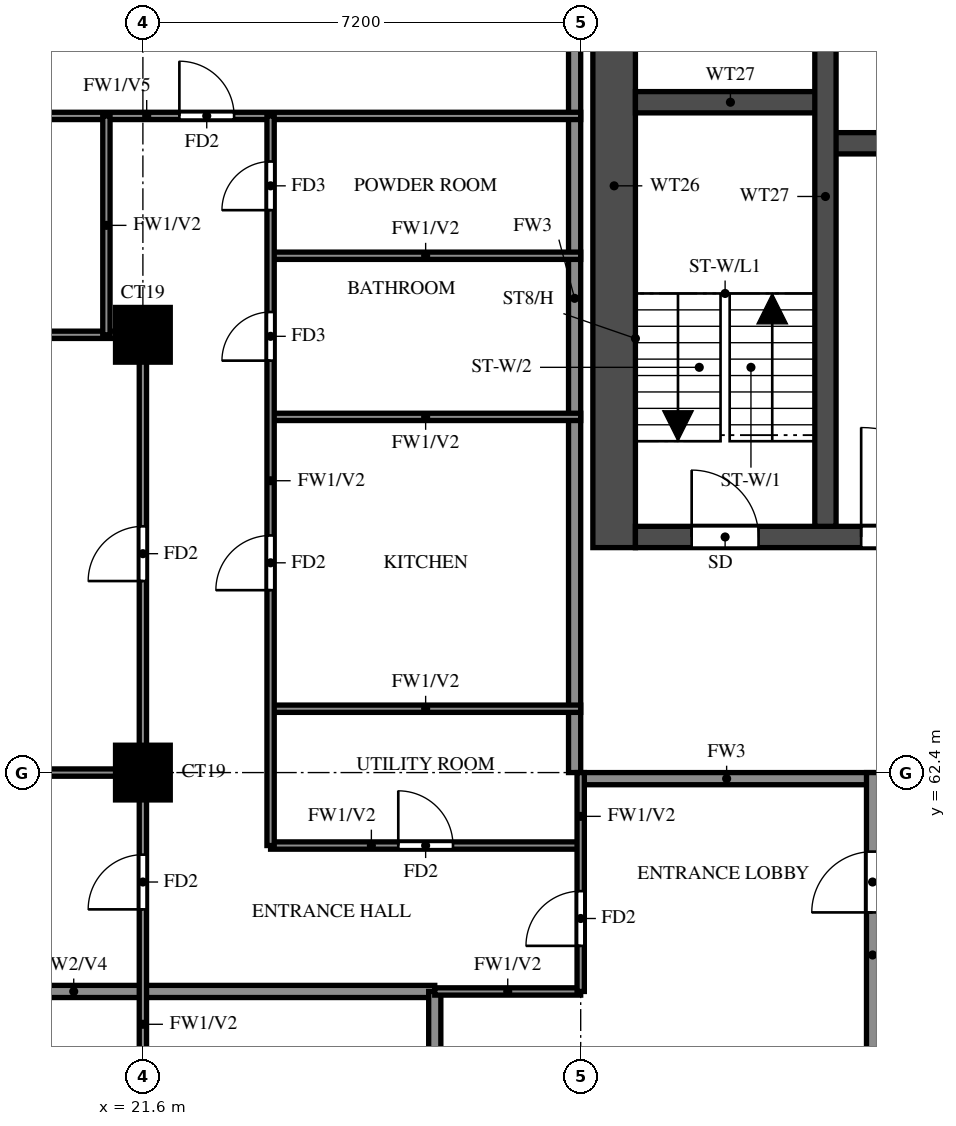
"""IFC4 building model, lengths in metres.
Left out: names, types, materials, properties, quantities, classifications, styles, units other than length and angle.
Written with IfcOpenShell. Run it as: python <this file> out.ifc"""

import sys

from ifc_helpers import new_model, si_unit, direction, frame, frame_2d, origin, origin_2d, place, context, subcontext, project, spatial, rectangle, extrude, source, transform, mapped, element, fill, save


model = new_model("IFC4")
c1 = context("Model", 3, precision=1e-05, world=origin(), true_north=direction((0.0, 1.0)))
c2 = subcontext(c1, "Body", "Model", "MODEL_VIEW")
j1 = project(units=[si_unit("LENGTHUNIT", "METRE"), si_unit("PLANEANGLEUNIT", "RADIAN")], contexts=[c1])
p1 = place(None, origin())
s1 = spatial("IfcSite", under=j1, at=p1, CompositionType="ELEMENT")
p2 = place(p1, origin())
s2 = spatial("IfcBuilding", under=s1, at=p2, CompositionType="ELEMENT")
p3 = place(p2, frame((0.0, 0.0, 174.5)))
s3 = spatial("IfcBuildingStorey", under=s2, at=p3, CompositionType="ELEMENT", Elevation=174.5)
m1 = source(origin(), c2, "Body", "SweptSolid", [
    extrude(rectangle(XDim=0.9, YDim=0.9, at=origin_2d()), origin(), (0.0, 0.0, 1.0), 3.2),
])
for number, where, z_axis, x_axis in (
    (1, (21.6, 62.4, 0.0), (0.0, 0.0, 1.0), (1.0, 0.0, 0.0)),
    (2, (21.6, 69.6, 0.0), (0.0, 0.0, 1.0), (1.0, 0.0, 0.0)),
):
    element("IfcColumn", number, at=place(p3, frame(where, z_axis=z_axis, x_axis=x_axis)), inside=s3, PredefinedType="COLUMN", context=c2, shape_type="MappedRepresentation", body=[
        mapped(m1, transform((0.0, 0.0, 0.0))),
    ])
p4 = place(p3, frame((29.35, 66.1, 0.0), z_axis=(0.0, 0.0, 1.0), x_axis=(0.0, 1.0, 0.0)))
e3 = element("IfcWall", 3, at=p4, inside=s3, PredefinedType="SHEAR", context=c2, shape_type="SweptSolid", body=[
    extrude(rectangle(XDim=11.9, YDim=0.7, at=frame_2d((5.95, 0.0))), origin(), (0.0, 0.0, 1.0), 3.2),
])
p5 = place(p3, frame((29.7, 66.275, 0.0), z_axis=(0.0, 0.0, 1.0), x_axis=(1.0, 0.0, 0.0)))
e4 = element("IfcWall", 4, at=p5, inside=s3, PredefinedType="SHEAR", context=c2, shape_type="SweptSolid", body=[
    extrude(rectangle(XDim=41.4, YDim=0.35, at=frame_2d((20.7, 0.0))), origin(), (0.0, 0.0, 1.0), 3.2),
])
p6 = place(p5, frame((0.925, 0.0, 0.0)))
e5 = element("IfcOpeningElement", 5, at=p6, cuts=e4, PredefinedType="OPENING", context=c2, shape_type="SweptSolid", body=[
    extrude(rectangle(XDim=1.1, YDim=2.1, at=frame_2d((0.55, 1.05))), frame((0.0, 0.185, 0.0), z_axis=(0.0, -1.0, 0.0), x_axis=(1.0, 0.0, 0.0)), (0.0, 0.0, 1.0), 0.37),
])
p7 = place(p5, frame((3.712, 0.0, 0.0)))
e6 = element("IfcOpeningElement", 6, at=p7, cuts=e4, PredefinedType="OPENING", context=c2, shape_type="SweptSolid", body=[
    extrude(rectangle(XDim=1.8, YDim=2.1, at=frame_2d((0.9, 1.05))), frame((0.0, 0.185, 0.0), z_axis=(0.0, -1.0, 0.0), x_axis=(1.0, 0.0, 0.0)), (0.0, 0.0, 1.0), 0.37),
])
p8 = place(p3, frame((32.825, 72.75, 0.0), z_axis=(0.0, 0.0, 1.0), x_axis=(1.0, 0.0, 0.0)))
e7 = element("IfcWall", 7, at=p8, inside=s3, PredefinedType="SHEAR", context=c2, shape_type="SweptSolid", body=[
    extrude(rectangle(XDim=35.15, YDim=0.35, at=frame_2d((17.575, 0.0))), origin(), (0.0, 0.0, 1.0), 3.2),
])
p9 = place(p8, frame((19.8, 0.0, 0.0)))
e8 = element("IfcOpeningElement", 8, at=p9, cuts=e7, PredefinedType="OPENING", context=c2, shape_type="SweptSolid", body=[
    extrude(rectangle(XDim=1.1, YDim=2.1, at=frame_2d((0.55, 1.05))), frame((0.0, 0.185, 0.0), z_axis=(0.0, -1.0, 0.0), x_axis=(1.0, 0.0, 0.0)), (0.0, 0.0, 1.0), 0.37),
])
p10 = place(p8, frame((27.7, 0.0, 0.0)))
e9 = element("IfcOpeningElement", 9, at=p10, cuts=e7, PredefinedType="OPENING", context=c2, shape_type="SweptSolid", body=[
    extrude(rectangle(XDim=1.1, YDim=2.1, at=frame_2d((0.55, 1.05))), frame((0.0, 0.185, 0.0), z_axis=(0.0, -1.0, 0.0), x_axis=(1.0, 0.0, 0.0)), (0.0, 0.0, 1.0), 0.37),
])
p11 = place(p8, frame((30.3, 0.0, 0.0)))
e10 = element("IfcOpeningElement", 10, at=p11, cuts=e7, PredefinedType="OPENING", context=c2, shape_type="SweptSolid", body=[
    extrude(rectangle(XDim=1.1, YDim=2.1, at=frame_2d((0.55, 1.05))), frame((0.0, 0.185, 0.0), z_axis=(0.0, -1.0, 0.0), x_axis=(1.0, 0.0, 0.0)), (0.0, 0.0, 1.0), 0.37),
])
p12 = place(p8, frame((3.8, 0.0, 0.0)))
e11 = element("IfcOpeningElement", 11, at=p12, cuts=e7, PredefinedType="OPENING", context=c2, shape_type="SweptSolid", body=[
    extrude(rectangle(XDim=1.1, YDim=2.1, at=frame_2d((0.55, 1.05))), frame((0.0, 0.185, 0.0), z_axis=(0.0, -1.0, 0.0), x_axis=(1.0, 0.0, 0.0)), (0.0, 0.0, 1.0), 0.37),
])
p13 = place(p8, frame((6.55, 0.0, 0.0)))
e12 = element("IfcOpeningElement", 12, at=p13, cuts=e7, PredefinedType="OPENING", context=c2, shape_type="SweptSolid", body=[
    extrude(rectangle(XDim=1.1, YDim=2.1, at=frame_2d((0.55, 1.05))), frame((0.0, 0.185, 0.0), z_axis=(0.0, -1.0, 0.0), x_axis=(1.0, 0.0, 0.0)), (0.0, 0.0, 1.0), 0.37),
])
p14 = place(p8, frame((9.3, 0.0, 0.0)))
e13 = element("IfcOpeningElement", 13, at=p14, cuts=e7, PredefinedType="OPENING", context=c2, shape_type="SweptSolid", body=[
    extrude(rectangle(XDim=1.1, YDim=2.1, at=frame_2d((0.55, 1.05))), frame((0.0, 0.185, 0.0), z_axis=(0.0, -1.0, 0.0), x_axis=(1.0, 0.0, 0.0)), (0.0, 0.0, 1.0), 0.37),
])
p15 = place(p8, frame((12.05, 0.0, 0.0)))
e14 = element("IfcOpeningElement", 14, at=p15, cuts=e7, PredefinedType="OPENING", context=c2, shape_type="SweptSolid", body=[
    extrude(rectangle(XDim=1.1, YDim=2.1, at=frame_2d((0.55, 1.05))), frame((0.0, 0.185, 0.0), z_axis=(0.0, -1.0, 0.0), x_axis=(1.0, 0.0, 0.0)), (0.0, 0.0, 1.0), 0.37),
])
p16 = place(p8, frame((14.8, 0.0, 0.0)))
e15 = element("IfcOpeningElement", 15, at=p16, cuts=e7, PredefinedType="OPENING", context=c2, shape_type="SweptSolid", body=[
    extrude(rectangle(XDim=1.1, YDim=2.1, at=frame_2d((0.55, 1.05))), frame((0.0, 0.185, 0.0), z_axis=(0.0, -1.0, 0.0), x_axis=(1.0, 0.0, 0.0)), (0.0, 0.0, 1.0), 0.37),
])
p17 = place(p8, frame((17.55, 0.0, 0.0)))
e16 = element("IfcOpeningElement", 16, at=p17, cuts=e7, PredefinedType="OPENING", context=c2, shape_type="SweptSolid", body=[
    extrude(rectangle(XDim=1.1, YDim=2.1, at=frame_2d((0.55, 1.05))), frame((0.0, 0.185, 0.0), z_axis=(0.0, -1.0, 0.0), x_axis=(1.0, 0.0, 0.0)), (0.0, 0.0, 1.0), 0.37),
])
p18 = place(p8, frame((0.938, 0.0, 0.0)))
e17 = element("IfcOpeningElement", 17, at=p18, cuts=e7, PredefinedType="OPENING", context=c2, shape_type="SweptSolid", body=[
    extrude(rectangle(XDim=1.1, YDim=2.1, at=frame_2d((0.55, 1.05))), frame((0.0, 0.185, 0.0), z_axis=(0.0, -1.0, 0.0), x_axis=(1.0, 0.0, 0.0)), (0.0, 0.0, 1.0), 0.37),
])
p19 = place(p3, frame((29.7, 73.425, 0.0), z_axis=(0.0, 0.0, 1.0), x_axis=(1.0, 0.0, 0.0)))
e18 = element("IfcWall", 18, at=p19, inside=s3, PredefinedType="SHEAR", context=c2, shape_type="SweptSolid", body=[
    extrude(rectangle(XDim=3.125, YDim=0.35, at=frame_2d((1.562, 0.0))), origin(), (0.0, 0.0, 1.0), 3.2),
])
p20 = place(p3, frame((32.825, 66.45, 0.0), z_axis=(0.0, 0.0, 1.0), x_axis=(0.0, 1.0, 0.0)))
e19 = element("IfcWall", 19, at=p20, inside=s3, PredefinedType="SHEAR", context=c2, shape_type="SweptSolid", body=[
    extrude(rectangle(XDim=10.85, YDim=0.35, at=frame_2d((5.425, 0.0))), origin(), (0.0, 0.0, 1.0), 3.2),
])
p21 = place(p3, frame((28.8, 62.3, 0.0), z_axis=(0.0, 0.0, 1.0), x_axis=(1.0, 0.0, 0.0)))
e20 = element("IfcWall", 20, at=p21, inside=s3, PredefinedType="SOLIDWALL", context=c2, shape_type="SweptSolid", body=[
    extrude(rectangle(XDim=4.8, YDim=0.2, at=frame_2d((2.4, 0.0))), origin(), (0.0, 0.0, 1.0), 3.2),
])
p22 = place(p3, frame((28.7, 62.4, 0.0), z_axis=(0.0, 0.0, 1.0), x_axis=(0.0, 1.0, 0.0)))
e21 = element("IfcWall", 21, at=p22, inside=s3, PredefinedType="SOLIDWALL", context=c2, shape_type="SweptSolid", body=[
    extrude(rectangle(XDim=15.6, YDim=0.2, at=frame_2d((7.8, 0.0))), origin(), (0.0, 0.0, 1.0), 3.2),
])
p23 = place(p3, frame((33.6, 56.4, 0.0), z_axis=(0.0, 0.0, 1.0), x_axis=(0.0, 1.0, 0.0)))
e22 = element("IfcWall", 22, at=p23, inside=s3, PredefinedType="SOLIDWALL", context=c2, shape_type="SweptSolid", body=[
    extrude(rectangle(XDim=6.0, YDim=0.2, at=frame_2d((3.0, 0.0))), origin(), (0.0, 0.0, 1.0), 3.2),
])
p24 = place(p23, frame((3.7, 0.0, 0.0)))
e23 = element("IfcOpeningElement", 23, at=p24, cuts=e22, PredefinedType="OPENING", context=c2, shape_type="SweptSolid", body=[
    extrude(rectangle(XDim=1.0, YDim=2.1, at=frame_2d((0.5, 1.05))), frame((0.0, 0.11, 0.0), z_axis=(0.0, -1.0, 0.0), x_axis=(1.0, 0.0, 0.0)), (0.0, 0.0, 1.0), 0.22),
])
p25 = place(p3, frame((14.525, 58.8, 0.0), z_axis=(0.0, 0.0, 1.0), x_axis=(1.0, 0.0, 0.0)))
e24 = element("IfcWall", 24, at=p25, inside=s3, PredefinedType="SOLIDWALL", context=c2, shape_type="SweptSolid", body=[
    extrude(rectangle(XDim=11.875, YDim=0.2, at=frame_2d((5.938, 0.0))), origin(), (0.0, 0.0, 1.0), 2.3),
])
p26 = place(p3, frame((26.4, 56.4, 0.0), z_axis=(0.0, 0.0, 1.0), x_axis=(0.0, 1.0, 0.0)))
e25 = element("IfcWall", 25, at=p26, inside=s3, PredefinedType="SOLIDWALL", context=c2, shape_type="SweptSolid", body=[
    extrude(rectangle(XDim=2.4, YDim=0.2, at=frame_2d((1.2, 0.0))), origin(), (0.0, 0.0, 1.0), 3.2),
])
p27 = place(p3, frame((26.4, 58.8, 0.0), z_axis=(0.0, 0.0, 1.0), x_axis=(1.0, 0.0, 0.0)))
e26 = element("IfcWall", 26, at=p27, inside=s3, PredefinedType="PARTITIONING", context=c2, shape_type="SweptSolid", body=[
    extrude(rectangle(XDim=2.4, YDim=0.12, at=frame_2d((1.2, 0.0))), origin(), (0.0, 0.0, 1.0), 3.2),
])
p28 = place(p3, frame((23.7, 61.2, 0.0), z_axis=(0.0, 0.0, 1.0), x_axis=(1.0, 0.0, 0.0)))
e27 = element("IfcWall", 27, at=p28, inside=s3, PredefinedType="PARTITIONING", context=c2, shape_type="SweptSolid", body=[
    extrude(rectangle(XDim=5.1, YDim=0.12, at=frame_2d((2.55, 0.0))), origin(), (0.0, 0.0, 1.0), 3.2),
])
p29 = place(p28, frame((2.1, 0.0, 0.0)))
e28 = element("IfcOpeningElement", 28, at=p29, cuts=e27, PredefinedType="OPENING", context=c2, shape_type="SweptSolid", body=[
    extrude(rectangle(XDim=0.9, YDim=2.1, at=frame_2d((0.45, 1.05))), frame((0.0, 0.07, 0.0), z_axis=(0.0, -1.0, 0.0), x_axis=(1.0, 0.0, 0.0)), (0.0, 0.0, 1.0), 0.14),
])
p30 = place(p3, frame((14.525, 62.4, 0.0), z_axis=(0.0, 0.0, 1.0), x_axis=(1.0, 0.0, 0.0)))
e29 = element("IfcWall", 29, at=p30, inside=s3, PredefinedType="PARTITIONING", context=c2, shape_type="SweptSolid", body=[
    extrude(rectangle(XDim=7.075, YDim=0.12, at=frame_2d((3.538, 0.0))), origin(), (0.0, 0.0, 1.0), 3.2),
])
for number, where, z_axis, x_axis in (
    (30, (23.7, 63.45, 0.0), (0.0, 0.0, 1.0), (1.0, 0.0, 0.0)),
    (31, (23.7, 68.25, 0.0), (0.0, 0.0, 1.0), (1.0, 0.0, 0.0)),
):
    element("IfcWall", number, at=place(p3, frame(where, z_axis=z_axis, x_axis=x_axis)), inside=s3, PredefinedType="PARTITIONING", context=c2, shape_type="SweptSolid", body=[
        extrude(rectangle(XDim=5.1, YDim=0.12, at=frame_2d((2.55, 0.0))), origin(), (0.0, 0.0, 1.0), 3.2),
    ])
p31 = place(p3, frame((14.525, 69.6, 0.0), z_axis=(0.0, 0.0, 1.0), x_axis=(1.0, 0.0, 0.0)))
e32 = element("IfcWall", 32, at=p31, inside=s3, PredefinedType="PARTITIONING", context=c2, shape_type="SweptSolid", body=[
    extrude(rectangle(XDim=7.075, YDim=0.12, at=frame_2d((3.538, 0.0))), origin(), (0.0, 0.0, 1.0), 3.2),
])
p32 = place(p31, frame((2.837, 0.0, 0.0)))
e33 = element("IfcOpeningElement", 33, at=p32, cuts=e32, PredefinedType="OPENING", context=c2, shape_type="SweptSolid", body=[
    extrude(rectangle(XDim=0.8, YDim=2.1, at=frame_2d((0.4, 1.05))), frame((0.0, 0.07, 0.0), z_axis=(0.0, -1.0, 0.0), x_axis=(1.0, 0.0, 0.0)), (0.0, 0.0, 1.0), 0.14),
])
p33 = place(p3, frame((23.7, 70.9, 0.0), z_axis=(0.0, 0.0, 1.0), x_axis=(1.0, 0.0, 0.0)))
e34 = element("IfcWall", 34, at=p33, inside=s3, PredefinedType="PARTITIONING", context=c2, shape_type="SweptSolid", body=[
    extrude(rectangle(XDim=5.1, YDim=0.12, at=frame_2d((2.55, 0.0))), origin(), (0.0, 0.0, 1.0), 3.2),
])
p34 = place(p3, frame((14.525, 73.2, 0.0), z_axis=(0.0, 0.0, 1.0), x_axis=(1.0, 0.0, 0.0)))
e35 = element("IfcWall", 35, at=p34, inside=s3, PredefinedType="PARTITIONING", context=c2, shape_type="SweptSolid", body=[
    extrude(rectangle(XDim=14.275, YDim=0.12, at=frame_2d((7.138, 0.0))), origin(), (0.0, 0.0, 1.0), 2.3),
])
p35 = place(p34, frame((7.675, 0.0, 0.0)))
e36 = element("IfcOpeningElement", 36, at=p35, cuts=e35, PredefinedType="OPENING", context=c2, shape_type="SweptSolid", body=[
    extrude(rectangle(XDim=0.9, YDim=2.1, at=frame_2d((0.45, 1.05))), frame((0.0, 0.07, 0.0), z_axis=(0.0, -1.0, 0.0), x_axis=(1.0, 0.0, 0.0)), (0.0, 0.0, 1.0), 0.14),
])
p36 = place(p3, frame((21.0, 69.6, 0.0), z_axis=(0.0, 0.0, 1.0), x_axis=(0.0, 1.0, 0.0)))
e37 = element("IfcWall", 37, at=p36, inside=s3, PredefinedType="PARTITIONING", context=c2, shape_type="SweptSolid", body=[
    extrude(rectangle(XDim=3.6, YDim=0.12, at=frame_2d((1.8, 0.0))), origin(), (0.0, 0.0, 1.0), 3.2),
])
p37 = place(p3, frame((21.6, 48.0, 0.0), z_axis=(0.0, 0.0, 1.0), x_axis=(0.0, 1.0, 0.0)))
e38 = element("IfcWall", 38, at=p37, inside=s3, PredefinedType="PARTITIONING", context=c2, shape_type="SweptSolid", body=[
    extrude(rectangle(XDim=21.6, YDim=0.12, at=frame_2d((10.8, 0.0))), origin(), (0.0, 0.0, 1.0), 3.2),
])
p38 = place(p37, frame((1.35, 0.0, 0.0)))
e39 = element("IfcOpeningElement", 39, at=p38, cuts=e38, PredefinedType="OPENING", context=c2, shape_type="SweptSolid", body=[
    extrude(rectangle(XDim=0.9, YDim=2.1, at=frame_2d((0.45, 1.05))), frame((0.0, 0.07, 0.0), z_axis=(0.0, -1.0, 0.0), x_axis=(1.0, 0.0, 0.0)), (0.0, 0.0, 1.0), 0.14),
])
p39 = place(p37, frame((7.95, 0.0, 0.0)))
e40 = element("IfcOpeningElement", 40, at=p39, cuts=e38, PredefinedType="OPENING", context=c2, shape_type="SweptSolid", body=[
    extrude(rectangle(XDim=1.5, YDim=2.1, at=frame_2d((0.75, 1.05))), frame((0.0, 0.07, 0.0), z_axis=(0.0, -1.0, 0.0), x_axis=(1.0, 0.0, 0.0)), (0.0, 0.0, 1.0), 0.14),
])
p40 = place(p37, frame((12.15, 0.0, 0.0)))
e41 = element("IfcOpeningElement", 41, at=p40, cuts=e38, PredefinedType="OPENING", context=c2, shape_type="SweptSolid", body=[
    extrude(rectangle(XDim=0.9, YDim=2.1, at=frame_2d((0.45, 1.05))), frame((0.0, 0.07, 0.0), z_axis=(0.0, -1.0, 0.0), x_axis=(1.0, 0.0, 0.0)), (0.0, 0.0, 1.0), 0.14),
])
p41 = place(p37, frame((17.55, 0.0, 0.0)))
e42 = element("IfcOpeningElement", 42, at=p41, cuts=e38, PredefinedType="OPENING", context=c2, shape_type="SweptSolid", body=[
    extrude(rectangle(XDim=0.9, YDim=2.1, at=frame_2d((0.45, 1.05))), frame((0.0, 0.07, 0.0), z_axis=(0.0, -1.0, 0.0), x_axis=(1.0, 0.0, 0.0)), (0.0, 0.0, 1.0), 0.14),
])
p42 = place(p3, frame((23.7, 61.2, 0.0), z_axis=(0.0, 0.0, 1.0), x_axis=(0.0, 1.0, 0.0)))
e43 = element("IfcWall", 43, at=p42, inside=s3, PredefinedType="PARTITIONING", context=c2, shape_type="SweptSolid", body=[
    extrude(rectangle(XDim=12.0, YDim=0.12, at=frame_2d((6.0, 0.0))), origin(), (0.0, 0.0, 1.0), 3.2),
])
p43 = place(p42, frame((4.2, 0.0, 0.0)))
e44 = element("IfcOpeningElement", 44, at=p43, cuts=e43, PredefinedType="OPENING", context=c2, shape_type="SweptSolid", body=[
    extrude(rectangle(XDim=0.9, YDim=2.1, at=frame_2d((0.45, 1.05))), frame((0.0, 0.07, 0.0), z_axis=(0.0, -1.0, 0.0), x_axis=(1.0, 0.0, 0.0)), (0.0, 0.0, 1.0), 0.14),
])
p44 = place(p42, frame((7.975, 0.0, 0.0)))
e45 = element("IfcOpeningElement", 45, at=p44, cuts=e43, PredefinedType="OPENING", context=c2, shape_type="SweptSolid", body=[
    extrude(rectangle(XDim=0.8, YDim=2.1, at=frame_2d((0.4, 1.05))), frame((0.0, 0.07, 0.0), z_axis=(0.0, -1.0, 0.0), x_axis=(1.0, 0.0, 0.0)), (0.0, 0.0, 1.0), 0.14),
])
p45 = place(p42, frame((10.45, 0.0, 0.0)))
e46 = element("IfcOpeningElement", 46, at=p45, cuts=e43, PredefinedType="OPENING", context=c2, shape_type="SweptSolid", body=[
    extrude(rectangle(XDim=0.8, YDim=2.1, at=frame_2d((0.4, 1.05))), frame((0.0, 0.07, 0.0), z_axis=(0.0, -1.0, 0.0), x_axis=(1.0, 0.0, 0.0)), (0.0, 0.0, 1.0), 0.14),
])
p46 = place(p3, frame((28.8, 58.8, 0.0), z_axis=(0.0, 0.0, 1.0), x_axis=(0.0, 1.0, 0.0)))
e47 = element("IfcWall", 47, at=p46, inside=s3, PredefinedType="PARTITIONING", context=c2, shape_type="SweptSolid", body=[
    extrude(rectangle(XDim=3.6, YDim=0.12, at=frame_2d((1.8, 0.0))), origin(), (0.0, 0.0, 1.0), 3.2),
])
p47 = place(p46, frame((0.75, 0.0, 0.0)))
e48 = element("IfcOpeningElement", 48, at=p47, cuts=e47, PredefinedType="OPENING", context=c2, shape_type="SweptSolid", body=[
    extrude(rectangle(XDim=0.9, YDim=2.1, at=frame_2d((0.45, 1.05))), frame((0.0, 0.07, 0.0), z_axis=(0.0, -1.0, 0.0), x_axis=(1.0, 0.0, 0.0)), (0.0, 0.0, 1.0), 0.14),
])
p48 = place(p6, origin())
e49 = element("IfcDoor", 49, at=p48, inside=s3, OperationType="SINGLE_SWING_LEFT", PredefinedType="DOOR", context=c2, shape_type="SweptSolid", body=[
    extrude(rectangle(XDim=1.1, YDim=2.1, at=frame_2d((0.55, 1.05))), frame((0.0, 0.025, 0.0), z_axis=(0.0, -1.0, 0.0), x_axis=(1.0, 0.0, 0.0)), (0.0, 0.0, 1.0), 0.05),
])
fill(e5, e49)
p49 = place(p7, origin())
e50 = element("IfcDoor", 50, at=p49, inside=s3, OperationType="DOUBLE_DOOR_SINGLE_SWING", PredefinedType="DOOR", context=c2, shape_type="SweptSolid", body=[
    extrude(rectangle(XDim=1.8, YDim=2.1, at=frame_2d((0.9, 1.05))), frame((0.0, 0.025, 0.0), z_axis=(0.0, -1.0, 0.0), x_axis=(1.0, 0.0, 0.0)), (0.0, 0.0, 1.0), 0.05),
])
fill(e6, e50)
p50 = place(p47, origin())
e51 = element("IfcDoor", 51, at=p50, inside=s3, OperationType="SINGLE_SWING_LEFT", PredefinedType="DOOR", context=c2, shape_type="SweptSolid", body=[
    extrude(rectangle(XDim=0.9, YDim=2.1, at=frame_2d((0.45, 1.05))), frame((0.0, 0.025, 0.0), z_axis=(0.0, -1.0, 0.0), x_axis=(1.0, 0.0, 0.0)), (0.0, 0.0, 1.0), 0.05),
])
fill(e48, e51)
p51 = place(p24, origin())
e52 = element("IfcDoor", 52, at=p51, inside=s3, OperationType="SINGLE_SWING_RIGHT", PredefinedType="DOOR", context=c2, shape_type="SweptSolid", body=[
    extrude(rectangle(XDim=1.0, YDim=2.1, at=frame_2d((0.5, 1.05))), frame((0.0, 0.025, 0.0), z_axis=(0.0, -1.0, 0.0), x_axis=(1.0, 0.0, 0.0)), (0.0, 0.0, 1.0), 0.05),
])
fill(e23, e52)
p52 = place(p40, origin())
e53 = element("IfcDoor", 53, at=p52, inside=s3, OperationType="SINGLE_SWING_LEFT", PredefinedType="DOOR", context=c2, shape_type="SweptSolid", body=[
    extrude(rectangle(XDim=0.9, YDim=2.1, at=frame_2d((0.45, 1.05))), frame((0.0, 0.025, 0.0), z_axis=(0.0, -1.0, 0.0), x_axis=(1.0, 0.0, 0.0)), (0.0, 0.0, 1.0), 0.05),
])
fill(e41, e53)
p53 = place(p41, origin())
e54 = element("IfcDoor", 54, at=p53, inside=s3, OperationType="SINGLE_SWING_LEFT", PredefinedType="DOOR", context=c2, shape_type="SweptSolid", body=[
    extrude(rectangle(XDim=0.9, YDim=2.1, at=frame_2d((0.45, 1.05))), frame((0.0, 0.025, 0.0), z_axis=(0.0, -1.0, 0.0), x_axis=(1.0, 0.0, 0.0)), (0.0, 0.0, 1.0), 0.05),
])
fill(e42, e54)
p54 = place(p35, origin())
e55 = element("IfcDoor", 55, at=p54, inside=s3, OperationType="SINGLE_SWING_LEFT", PredefinedType="DOOR", context=c2, shape_type="SweptSolid", body=[
    extrude(rectangle(XDim=0.9, YDim=2.1, at=frame_2d((0.45, 1.05))), frame((0.0, 0.025, 0.0), z_axis=(0.0, -1.0, 0.0), x_axis=(1.0, 0.0, 0.0)), (0.0, 0.0, 1.0), 0.05),
])
fill(e36, e55)
p55 = place(p29, origin())
e56 = element("IfcDoor", 56, at=p55, inside=s3, OperationType="SINGLE_SWING_LEFT", PredefinedType="DOOR", context=c2, shape_type="SweptSolid", body=[
    extrude(rectangle(XDim=0.9, YDim=2.1, at=frame_2d((0.45, 1.05))), frame((0.0, 0.025, 0.0), z_axis=(0.0, -1.0, 0.0), x_axis=(1.0, 0.0, 0.0)), (0.0, 0.0, 1.0), 0.05),
])
fill(e28, e56)
p56 = place(p43, origin())
e57 = element("IfcDoor", 57, at=p56, inside=s3, OperationType="SINGLE_SWING_RIGHT", PredefinedType="DOOR", context=c2, shape_type="SweptSolid", body=[
    extrude(rectangle(XDim=0.9, YDim=2.1, at=frame_2d((0.45, 1.05))), frame((0.0, 0.025, 0.0), z_axis=(0.0, -1.0, 0.0), x_axis=(1.0, 0.0, 0.0)), (0.0, 0.0, 1.0), 0.05),
])
fill(e44, e57)
p57 = place(p44, origin())
e58 = element("IfcDoor", 58, at=p57, inside=s3, OperationType="SINGLE_SWING_LEFT", PredefinedType="DOOR", context=c2, shape_type="SweptSolid", body=[
    extrude(rectangle(XDim=0.8, YDim=2.1, at=frame_2d((0.4, 1.05))), frame((0.0, 0.025, 0.0), z_axis=(0.0, -1.0, 0.0), x_axis=(1.0, 0.0, 0.0)), (0.0, 0.0, 1.0), 0.05),
])
fill(e45, e58)
p58 = place(p45, origin())
e59 = element("IfcDoor", 59, at=p58, inside=s3, OperationType="SINGLE_SWING_LEFT", PredefinedType="DOOR", context=c2, shape_type="SweptSolid", body=[
    extrude(rectangle(XDim=0.8, YDim=2.1, at=frame_2d((0.4, 1.05))), frame((0.0, 0.025, 0.0), z_axis=(0.0, -1.0, 0.0), x_axis=(1.0, 0.0, 0.0)), (0.0, 0.0, 1.0), 0.05),
])
fill(e46, e59)
save(model, sys.argv[1])
